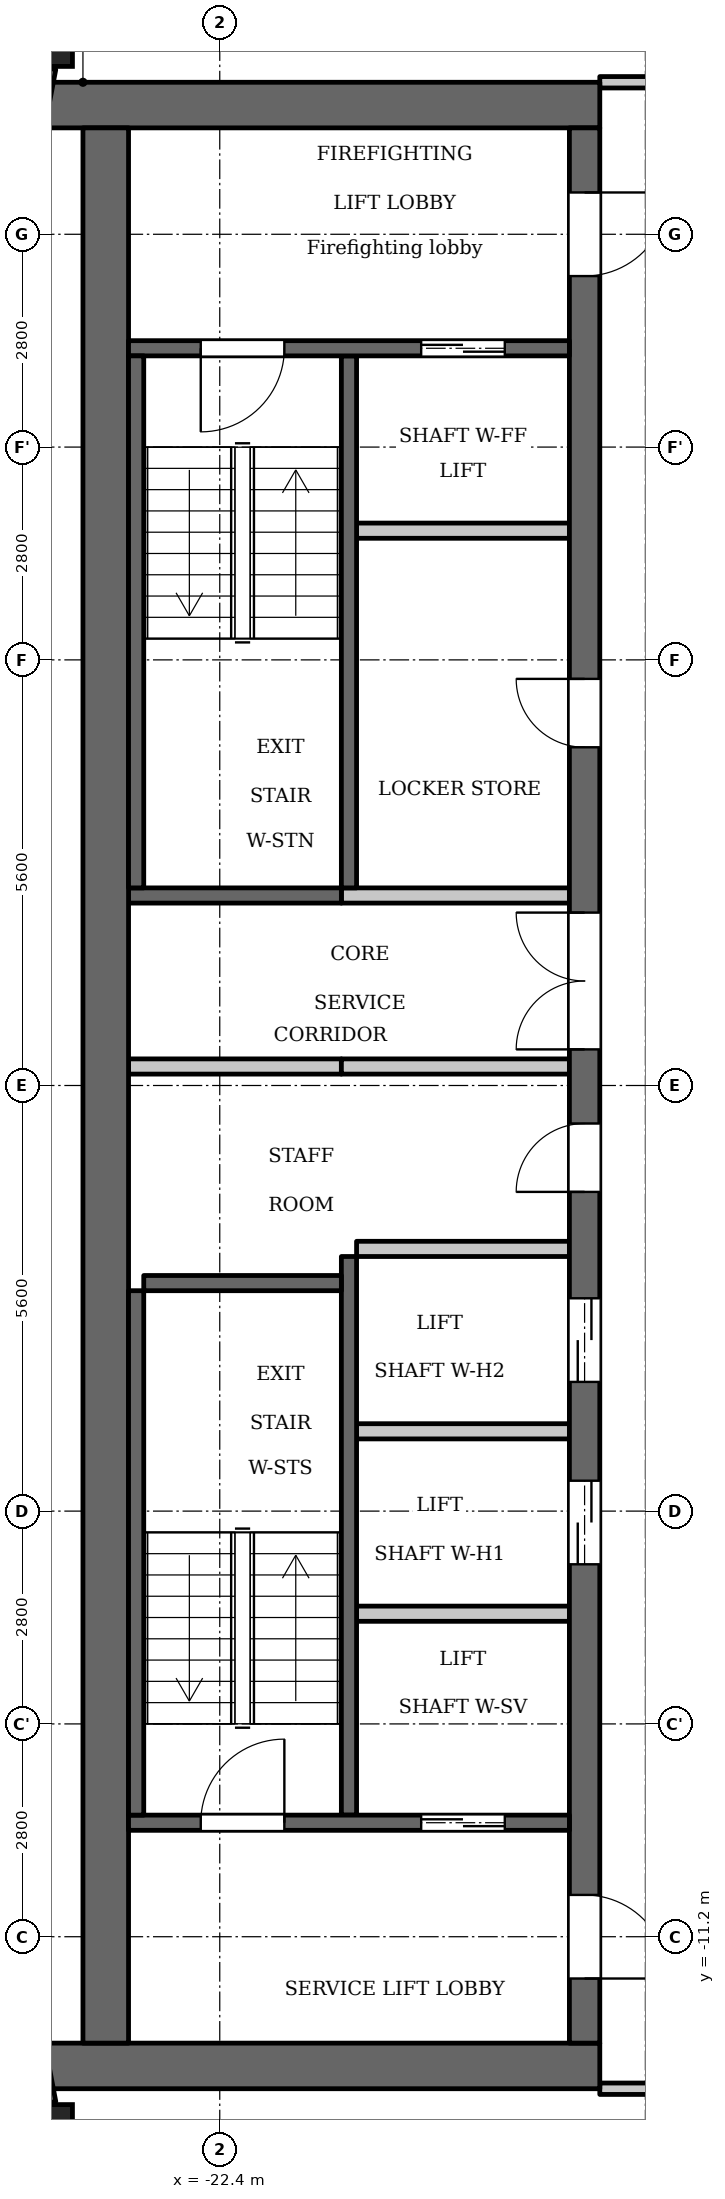
"""IFC4 building model, lengths in metres.
Left out: names, types, materials, properties, quantities, classifications, styles, units other than length and angle.
Written with IfcOpenShell. Run it as: python <this file> out.ifc"""

import sys

from ifc_helpers import new_model, si_unit, direction, frame, frame_2d, origin, origin_2d, place, context, subcontext, project, spatial, rectangle, extrude, element, fill, save


model = new_model("IFC4")
c1 = context("Model", 3, precision=1e-05, world=origin(), true_north=direction((0.0, 1.0)))
c2 = subcontext(c1, "Body", "Model", "MODEL_VIEW")
j1 = project(units=[si_unit("LENGTHUNIT", "METRE"), si_unit("PLANEANGLEUNIT", "RADIAN")], contexts=[c1])
p1 = place(None, origin())
s1 = spatial("IfcSite", under=j1, at=p1, CompositionType="ELEMENT")
p2 = place(p1, origin())
s2 = spatial("IfcBuilding", under=s1, at=p2, CompositionType="ELEMENT")
p3 = place(p2, frame((0.0, 0.0, 255.7)))
s3 = spatial("IfcBuildingStorey", under=s2, at=p3, CompositionType="ELEMENT", Elevation=255.7)
for number, where, z_axis, x_axis in (
    (1, (-24.738, 13.809, 0.0), (0.0, 0.0, 1.0), (1.0, 0.0, 0.0)),
    (2, (-24.738, -13.809, 0.0), (0.0, 0.0, 1.0), (1.0, 0.0, 0.0)),
):
    element("IfcColumn", number, at=place(p3, frame(where, z_axis=z_axis, x_axis=x_axis)), inside=s3, PredefinedType="COLUMN", context=c2, shape_type="SweptSolid", body=[
        extrude(rectangle(XDim=0.8, YDim=0.8, at=origin_2d()), origin(), (0.0, 0.0, 1.0), 3.5),
    ])
for number, where, z_axis, x_axis in (
    (3, (-24.705, 13.395, 0.0), (0.0, 0.0, 1.0), (-0.187, -0.982, 0.0)),
    (4, (-25.053, -11.572, 0.0), (0.0, 0.0, 1.0), (0.187, -0.982, 0.0)),
):
    element("IfcWall", number, at=place(p3, frame(where, z_axis=z_axis, x_axis=x_axis)), inside=s3, PredefinedType="SOLIDWALL", context=c2, shape_type="SweptSolid", body=[
        extrude(rectangle(XDim=1.856, YDim=0.3, at=frame_2d((0.928, 0.0))), origin(), (0.0, 0.0, 1.0), 2.55),
    ])
p4 = place(p3, frame((-20.7, 2.6, 0.0), z_axis=(0.0, 0.0, 1.0), x_axis=(0.0, 1.0, 0.0)))
e5 = element("IfcWall", 5, at=p4, inside=s3, PredefinedType="SHEAR", context=c2, shape_type="SweptSolid", body=[
    extrude(rectangle(XDim=7.0, YDim=0.2, at=frame_2d((3.5, 0.0))), origin(), (0.0, 0.0, 1.0), 3.2),
])
p5 = place(p3, frame((-20.7, -9.6, 0.0), z_axis=(0.0, 0.0, 1.0), x_axis=(0.0, 1.0, 0.0)))
e6 = element("IfcWall", 6, at=p5, inside=s3, PredefinedType="SHEAR", context=c2, shape_type="SweptSolid", body=[
    extrude(rectangle(XDim=7.35, YDim=0.2, at=frame_2d((3.675, 0.0))), origin(), (0.0, 0.0, 1.0), 3.2),
])
p6 = place(p3, frame((-20.8, 2.5, 0.0), z_axis=(0.0, 0.0, 1.0), x_axis=(-1.0, 0.0, 0.0)))
e7 = element("IfcWall", 7, at=p6, inside=s3, PredefinedType="SHEAR", context=c2, shape_type="SweptSolid", body=[
    extrude(rectangle(XDim=2.8, YDim=0.2, at=frame_2d((1.4, 0.0))), origin(), (0.0, 0.0, 1.0), 3.2),
])
p7 = place(p3, frame((-20.8, 0.25, 0.0), z_axis=(0.0, 0.0, 1.0), x_axis=(-1.0, 0.0, 0.0)))
e8 = element("IfcWall", 8, at=p7, inside=s3, PredefinedType="PARTITIONING", context=c2, shape_type="SweptSolid", body=[
    extrude(rectangle(XDim=2.8, YDim=0.2, at=frame_2d((1.4, 0.0))), origin(), (0.0, 0.0, 1.0), 3.2),
])
for number, where, z_axis, x_axis in (
    (9, (-17.4, 12.9, 0.0), (0.0, 0.0, 1.0), (-1.0, 0.0, 0.0)),
    (10, (-17.4, -12.9, 0.0), (0.0, 0.0, 1.0), (-1.0, 0.0, 0.0)),
):
    element("IfcWall", number, at=place(p3, frame(where, z_axis=z_axis, x_axis=x_axis)), inside=s3, PredefinedType="SHEAR", context=c2, shape_type="SweptSolid", body=[
        extrude(rectangle(XDim=7.32, YDim=0.6, at=frame_2d((3.66, 0.0))), origin(), (0.0, 0.0, 1.0), 3.2),
    ])
p8 = place(p3, frame((-17.6, -12.6, 0.0), z_axis=(0.0, 0.0, 1.0), x_axis=(0.0, 1.0, 0.0)))
e11 = element("IfcWall", 11, at=p8, inside=s3, PredefinedType="SHEAR", context=c2, shape_type="SweptSolid", body=[
    extrude(rectangle(XDim=25.2, YDim=0.4, at=frame_2d((12.6, 0.0))), origin(), (0.0, 0.0, 1.0), 3.2),
])
p9 = place(p8, frame((6.3, 0.0, 0.0)))
e12 = element("IfcOpeningElement", 12, at=p9, cuts=e11, PredefinedType="OPENING", context=c2, shape_type="SweptSolid", body=[
    extrude(rectangle(XDim=1.1, YDim=2.1, at=frame_2d((0.55, 1.05))), frame((0.0, 0.21, 0.0), z_axis=(0.0, -1.0, 0.0), x_axis=(1.0, 0.0, 0.0)), (0.0, 0.0, 1.0), 0.42),
])
p10 = place(p8, frame((8.7, 0.0, 0.0)))
e13 = element("IfcOpeningElement", 13, at=p10, cuts=e11, PredefinedType="OPENING", context=c2, shape_type="SweptSolid", body=[
    extrude(rectangle(XDim=1.1, YDim=2.1, at=frame_2d((0.55, 1.05))), frame((0.0, 0.21, 0.0), z_axis=(0.0, -1.0, 0.0), x_axis=(1.0, 0.0, 0.0)), (0.0, 0.0, 1.0), 0.42),
])
p11 = place(p8, frame((11.2, 0.0, 0.0)))
e14 = element("IfcOpeningElement", 14, at=p11, cuts=e11, PredefinedType="OPENING", context=c2, shape_type="SweptSolid", body=[
    extrude(rectangle(XDim=0.9, YDim=2.1, at=frame_2d((0.45, 1.05))), frame((0.0, 0.21, 0.0), z_axis=(0.0, -1.0, 0.0), x_axis=(1.0, 0.0, 0.0)), (0.0, 0.0, 1.0), 0.42),
])
p12 = place(p8, frame((17.05, 0.0, 0.0)))
e15 = element("IfcOpeningElement", 15, at=p12, cuts=e11, PredefinedType="OPENING", context=c2, shape_type="SweptSolid", body=[
    extrude(rectangle(XDim=0.9, YDim=2.1, at=frame_2d((0.45, 1.05))), frame((0.0, 0.21, 0.0), z_axis=(0.0, -1.0, 0.0), x_axis=(1.0, 0.0, 0.0)), (0.0, 0.0, 1.0), 0.42),
])
p13 = place(p8, frame((23.25, 0.0, 0.0)))
e16 = element("IfcOpeningElement", 16, at=p13, cuts=e11, PredefinedType="OPENING", context=c2, shape_type="SweptSolid", body=[
    extrude(rectangle(XDim=1.1, YDim=2.1, at=frame_2d((0.55, 1.05))), frame((0.0, 0.21, 0.0), z_axis=(0.0, -1.0, 0.0), x_axis=(1.0, 0.0, 0.0)), (0.0, 0.0, 1.0), 0.42),
])
p14 = place(p8, frame((0.85, 0.0, 0.0)))
e17 = element("IfcOpeningElement", 17, at=p14, cuts=e11, PredefinedType="OPENING", context=c2, shape_type="SweptSolid", body=[
    extrude(rectangle(XDim=1.1, YDim=2.1, at=frame_2d((0.55, 1.05))), frame((0.0, 0.21, 0.0), z_axis=(0.0, -1.0, 0.0), x_axis=(1.0, 0.0, 0.0)), (0.0, 0.0, 1.0), 0.42),
])
p15 = place(p8, frame((13.075, 0.0, 0.0)))
e18 = element("IfcOpeningElement", 18, at=p15, cuts=e11, PredefinedType="OPENING", context=c2, shape_type="SweptSolid", body=[
    extrude(rectangle(XDim=1.8, YDim=2.1, at=frame_2d((0.9, 1.05))), frame((0.0, 0.21, 0.0), z_axis=(0.0, -1.0, 0.0), x_axis=(1.0, 0.0, 0.0)), (0.0, 0.0, 1.0), 0.42),
])
p16 = place(p3, frame((-23.9, -12.6, 0.0), z_axis=(0.0, 0.0, 1.0), x_axis=(0.0, 1.0, 0.0)))
e19 = element("IfcWall", 19, at=p16, inside=s3, PredefinedType="SHEAR", context=c2, shape_type="SweptSolid", body=[
    extrude(rectangle(XDim=25.2, YDim=0.6, at=frame_2d((12.6, 0.0))), origin(), (0.0, 0.0, 1.0), 3.2),
])
p17 = place(p3, frame((-17.8, -9.7, 0.0), z_axis=(0.0, 0.0, 1.0), x_axis=(-1.0, 0.0, 0.0)))
e20 = element("IfcWall", 20, at=p17, inside=s3, PredefinedType="SHEAR", context=c2, shape_type="SweptSolid", body=[
    extrude(rectangle(XDim=5.8, YDim=0.2, at=frame_2d((2.9, 0.0))), origin(), (0.0, 0.0, 1.0), 3.2),
])
p18 = place(p17, frame((0.85, 0.0, 0.0)))
e21 = element("IfcOpeningElement", 21, at=p18, cuts=e20, PredefinedType="OPENING", context=c2, shape_type="SweptSolid", body=[
    extrude(rectangle(XDim=1.1, YDim=2.1, at=frame_2d((0.55, 1.05))), frame((0.0, 0.11, 0.0), z_axis=(0.0, -1.0, 0.0), x_axis=(1.0, 0.0, 0.0)), (0.0, 0.0, 1.0), 0.22),
])
p19 = place(p17, frame((3.75, 0.0, 0.0)))
e22 = element("IfcOpeningElement", 22, at=p19, cuts=e20, PredefinedType="OPENING", context=c2, shape_type="SweptSolid", body=[
    extrude(rectangle(XDim=1.1, YDim=2.1, at=frame_2d((0.55, 1.05))), frame((0.0, 0.11, 0.0), z_axis=(0.0, -1.0, 0.0), x_axis=(1.0, 0.0, 0.0)), (0.0, 0.0, 1.0), 0.22),
])
for number, where, z_axis, x_axis in (
    (23, (-17.8, -6.95, 0.0), (0.0, 0.0, 1.0), (-1.0, 0.0, 0.0)),
    (24, (-17.8, -4.55, 0.0), (0.0, 0.0, 1.0), (-1.0, 0.0, 0.0)),
    (25, (-17.8, -2.15, 0.0), (0.0, 0.0, 1.0), (-1.0, 0.0, 0.0)),
):
    element("IfcWall", number, at=place(p3, frame(where, z_axis=z_axis, x_axis=x_axis)), inside=s3, PredefinedType="PARTITIONING", context=c2, shape_type="SweptSolid", body=[
        extrude(rectangle(XDim=2.8, YDim=0.2, at=frame_2d((1.4, 0.0))), origin(), (0.0, 0.0, 1.0), 3.2),
    ])
for number, where, z_axis, x_axis in (
    (26, (-17.8, 0.25, 0.0), (0.0, 0.0, 1.0), (-1.0, 0.0, 0.0)),
    (27, (-17.8, 2.5, 0.0), (0.0, 0.0, 1.0), (-1.0, 0.0, 0.0)),
):
    element("IfcWall", number, at=place(p3, frame(where, z_axis=z_axis, x_axis=x_axis)), inside=s3, PredefinedType="PARTITIONING", context=c2, shape_type="SweptSolid", body=[
        extrude(rectangle(XDim=3.0, YDim=0.2, at=frame_2d((1.5, 0.0))), origin(), (0.0, 0.0, 1.0), 3.2),
    ])
p20 = place(p3, frame((-17.8, 7.3, 0.0), z_axis=(0.0, 0.0, 1.0), x_axis=(-1.0, 0.0, 0.0)))
e28 = element("IfcWall", 28, at=p20, inside=s3, PredefinedType="PARTITIONING", context=c2, shape_type="SweptSolid", body=[
    extrude(rectangle(XDim=2.8, YDim=0.2, at=frame_2d((1.4, 0.0))), origin(), (0.0, 0.0, 1.0), 3.2),
])
p21 = place(p3, frame((-17.8, 9.7, 0.0), z_axis=(0.0, 0.0, 1.0), x_axis=(-1.0, 0.0, 0.0)))
e29 = element("IfcWall", 29, at=p21, inside=s3, PredefinedType="SHEAR", context=c2, shape_type="SweptSolid", body=[
    extrude(rectangle(XDim=5.8, YDim=0.2, at=frame_2d((2.9, 0.0))), origin(), (0.0, 0.0, 1.0), 3.2),
])
p22 = place(p21, frame((0.85, 0.0, 0.0)))
e30 = element("IfcOpeningElement", 30, at=p22, cuts=e29, PredefinedType="OPENING", context=c2, shape_type="SweptSolid", body=[
    extrude(rectangle(XDim=1.1, YDim=2.1, at=frame_2d((0.55, 1.05))), frame((0.0, 0.11, 0.0), z_axis=(0.0, -1.0, 0.0), x_axis=(1.0, 0.0, 0.0)), (0.0, 0.0, 1.0), 0.22),
])
p23 = place(p21, frame((3.75, 0.0, 0.0)))
e31 = element("IfcOpeningElement", 31, at=p23, cuts=e29, PredefinedType="OPENING", context=c2, shape_type="SweptSolid", body=[
    extrude(rectangle(XDim=1.1, YDim=2.1, at=frame_2d((0.55, 1.05))), frame((0.0, 0.11, 0.0), z_axis=(0.0, -1.0, 0.0), x_axis=(1.0, 0.0, 0.0)), (0.0, 0.0, 1.0), 0.22),
])
p24 = place(p3, frame((-23.5, 2.6, 0.0), z_axis=(0.0, 0.0, 1.0), x_axis=(0.0, 1.0, 0.0)))
e32 = element("IfcWall", 32, at=p24, inside=s3, PredefinedType="SHEAR", context=c2, shape_type="SweptSolid", body=[
    extrude(rectangle(XDim=7.0, YDim=0.2, at=frame_2d((3.5, 0.0))), origin(), (0.0, 0.0, 1.0), 3.2),
])
p25 = place(p3, frame((-23.5, -9.6, 0.0), z_axis=(0.0, 0.0, 1.0), x_axis=(0.0, 1.0, 0.0)))
e33 = element("IfcWall", 33, at=p25, inside=s3, PredefinedType="SHEAR", context=c2, shape_type="SweptSolid", body=[
    extrude(rectangle(XDim=6.9, YDim=0.2, at=frame_2d((3.45, 0.0))), origin(), (0.0, 0.0, 1.0), 3.2),
])
p26 = place(p3, frame((-20.8, -2.6, 0.0), z_axis=(0.0, 0.0, 1.0), x_axis=(-1.0, 0.0, 0.0)))
e34 = element("IfcWall", 34, at=p26, inside=s3, PredefinedType="SHEAR", context=c2, shape_type="SweptSolid", body=[
    extrude(rectangle(XDim=2.6, YDim=0.2, at=frame_2d((1.3, 0.0))), origin(), (0.0, 0.0, 1.0), 3.2),
])
p27 = place(p3, frame((-17.4, -13.2, 0.0), z_axis=(0.0, 0.0, 1.0), x_axis=(1.0, 0.0, 0.0)))
e35 = element("IfcWall", 35, at=p27, inside=s3, PredefinedType="PARTITIONING", context=c2, shape_type="SweptSolid", body=[
    extrude(rectangle(XDim=2.325, YDim=0.15, at=frame_2d((1.163, 0.0))), origin(), (0.0, 0.0, 1.0), 3.2),
])
p28 = place(p27, frame((0.65, 0.0, 0.0)))
e36 = element("IfcOpeningElement", 36, at=p28, cuts=e35, PredefinedType="OPENING", context=c2, shape_type="SweptSolid", body=[
    extrude(rectangle(XDim=1.0, YDim=2.1, at=frame_2d((0.5, 1.05))), frame((0.0, 0.085, 0.0), z_axis=(0.0, -1.0, 0.0), x_axis=(1.0, 0.0, 0.0)), (0.0, 0.0, 1.0), 0.17),
])
p29 = place(p3, frame((-17.4, 13.2, 0.0), z_axis=(0.0, 0.0, 1.0), x_axis=(1.0, 0.0, 0.0)))
e37 = element("IfcWall", 37, at=p29, inside=s3, PredefinedType="PARTITIONING", context=c2, shape_type="SweptSolid", body=[
    extrude(rectangle(XDim=2.325, YDim=0.15, at=frame_2d((1.163, 0.0))), origin(), (0.0, 0.0, 1.0), 3.2),
])
p30 = place(p29, frame((0.75, 0.0, 0.0)))
e38 = element("IfcOpeningElement", 38, at=p30, cuts=e37, PredefinedType="OPENING", context=c2, shape_type="SweptSolid", body=[
    extrude(rectangle(XDim=1.0, YDim=2.1, at=frame_2d((0.5, 1.05))), frame((0.0, 0.085, 0.0), z_axis=(0.0, -1.0, 0.0), x_axis=(1.0, 0.0, 0.0)), (0.0, 0.0, 1.0), 0.17),
])
p31 = place(p18, origin())
e39 = element("IfcDoor", 39, at=p31, inside=s3, OperationType="DOUBLE_DOOR_SLIDING", PredefinedType="DOOR", context=c2, shape_type="SweptSolid", body=[
    extrude(rectangle(XDim=1.1, YDim=2.1, at=frame_2d((0.55, 1.05))), frame((0.0, 0.025, 0.0), z_axis=(0.0, -1.0, 0.0), x_axis=(1.0, 0.0, 0.0)), (0.0, 0.0, 1.0), 0.05),
])
fill(e21, e39)
p32 = place(p9, origin())
e40 = element("IfcDoor", 40, at=p32, inside=s3, OperationType="DOUBLE_DOOR_SLIDING", PredefinedType="DOOR", context=c2, shape_type="SweptSolid", body=[
    extrude(rectangle(XDim=1.1, YDim=2.1, at=frame_2d((0.55, 1.05))), frame((0.0, 0.025, 0.0), z_axis=(0.0, -1.0, 0.0), x_axis=(1.0, 0.0, 0.0)), (0.0, 0.0, 1.0), 0.05),
])
fill(e12, e40)
p33 = place(p10, origin())
e41 = element("IfcDoor", 41, at=p33, inside=s3, OperationType="DOUBLE_DOOR_SLIDING", PredefinedType="DOOR", context=c2, shape_type="SweptSolid", body=[
    extrude(rectangle(XDim=1.1, YDim=2.1, at=frame_2d((0.55, 1.05))), frame((0.0, 0.025, 0.0), z_axis=(0.0, -1.0, 0.0), x_axis=(1.0, 0.0, 0.0)), (0.0, 0.0, 1.0), 0.05),
])
fill(e13, e41)
p34 = place(p11, origin())
e42 = element("IfcDoor", 42, at=p34, inside=s3, OperationType="SINGLE_SWING_RIGHT", PredefinedType="DOOR", context=c2, shape_type="SweptSolid", body=[
    extrude(rectangle(XDim=0.9, YDim=2.1, at=frame_2d((0.45, 1.05))), frame((0.0, 0.025, 0.0), z_axis=(0.0, -1.0, 0.0), x_axis=(1.0, 0.0, 0.0)), (0.0, 0.0, 1.0), 0.05),
])
fill(e14, e42)
p35 = place(p12, origin())
e43 = element("IfcDoor", 43, at=p35, inside=s3, OperationType="SINGLE_SWING_LEFT", PredefinedType="DOOR", context=c2, shape_type="SweptSolid", body=[
    extrude(rectangle(XDim=0.9, YDim=2.1, at=frame_2d((0.45, 1.05))), frame((0.0, 0.025, 0.0), z_axis=(0.0, -1.0, 0.0), x_axis=(1.0, 0.0, 0.0)), (0.0, 0.0, 1.0), 0.05),
])
fill(e15, e43)
p36 = place(p22, origin())
e44 = element("IfcDoor", 44, at=p36, inside=s3, OperationType="DOUBLE_DOOR_SLIDING", PredefinedType="DOOR", context=c2, shape_type="SweptSolid", body=[
    extrude(rectangle(XDim=1.1, YDim=2.1, at=frame_2d((0.55, 1.05))), frame((0.0, 0.025, 0.0), z_axis=(0.0, -1.0, 0.0), x_axis=(1.0, 0.0, 0.0)), (0.0, 0.0, 1.0), 0.05),
])
fill(e30, e44)
p37 = place(p13, origin())
e45 = element("IfcDoor", 45, at=p37, inside=s3, OperationType="SINGLE_SWING_RIGHT", PredefinedType="DOOR", context=c2, shape_type="SweptSolid", body=[
    extrude(rectangle(XDim=1.1, YDim=2.1, at=frame_2d((0.55, 1.05))), frame((0.0, 0.025, 0.0), z_axis=(0.0, -1.0, 0.0), x_axis=(1.0, 0.0, 0.0)), (0.0, 0.0, 1.0), 0.05),
])
fill(e16, e45)
p38 = place(p14, origin())
e46 = element("IfcDoor", 46, at=p38, inside=s3, OperationType="SINGLE_SWING_LEFT", PredefinedType="DOOR", context=c2, shape_type="SweptSolid", body=[
    extrude(rectangle(XDim=1.1, YDim=2.1, at=frame_2d((0.55, 1.05))), frame((0.0, 0.025, 0.0), z_axis=(0.0, -1.0, 0.0), x_axis=(1.0, 0.0, 0.0)), (0.0, 0.0, 1.0), 0.05),
])
fill(e17, e46)
p39 = place(p23, origin())
e47 = element("IfcDoor", 47, at=p39, inside=s3, OperationType="SINGLE_SWING_LEFT", PredefinedType="DOOR", context=c2, shape_type="SweptSolid", body=[
    extrude(rectangle(XDim=1.1, YDim=2.1, at=frame_2d((0.55, 1.05))), frame((0.0, 0.025, 0.0), z_axis=(0.0, -1.0, 0.0), x_axis=(1.0, 0.0, 0.0)), (0.0, 0.0, 1.0), 0.05),
])
fill(e31, e47)
p40 = place(p19, origin())
e48 = element("IfcDoor", 48, at=p40, inside=s3, OperationType="SINGLE_SWING_LEFT", PredefinedType="DOOR", context=c2, shape_type="SweptSolid", body=[
    extrude(rectangle(XDim=1.1, YDim=2.1, at=frame_2d((0.55, 1.05))), frame((0.0, 0.025, 0.0), z_axis=(0.0, -1.0, 0.0), x_axis=(1.0, 0.0, 0.0)), (0.0, 0.0, 1.0), 0.05),
])
fill(e22, e48)
p41 = place(p15, origin())
e49 = element("IfcDoor", 49, at=p41, inside=s3, OperationType="DOUBLE_DOOR_SINGLE_SWING", PredefinedType="DOOR", context=c2, shape_type="SweptSolid", body=[
    extrude(rectangle(XDim=1.8, YDim=2.1, at=frame_2d((0.9, 1.05))), frame((0.0, 0.025, 0.0), z_axis=(0.0, -1.0, 0.0), x_axis=(1.0, 0.0, 0.0)), (0.0, 0.0, 1.0), 0.05),
])
fill(e18, e49)
save(model, sys.argv[1])
